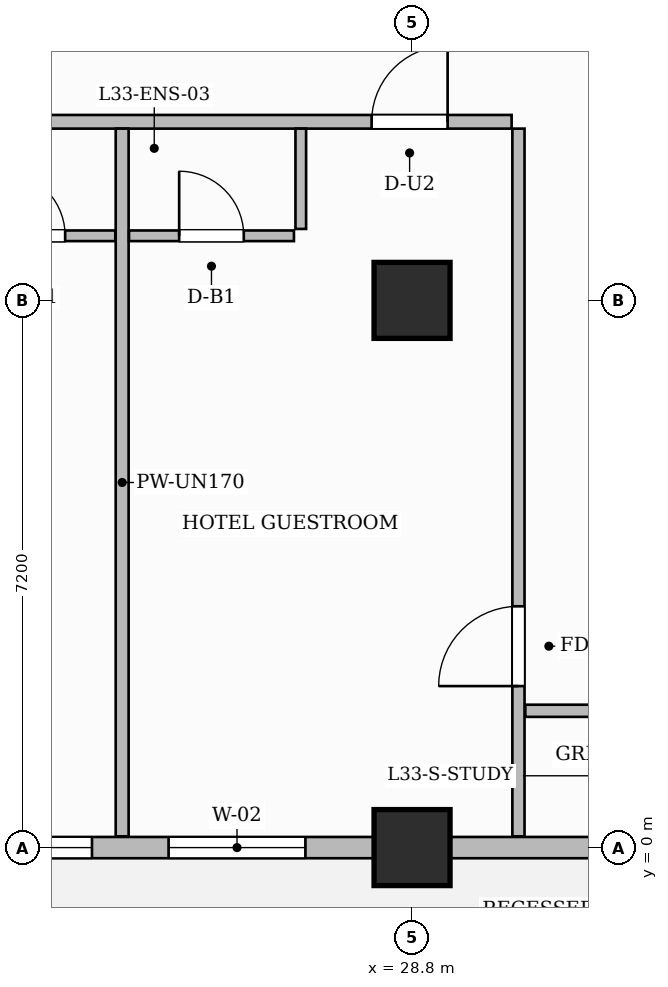
"""IFC4 building model, lengths in metres.
Left out: names, types, materials, properties, quantities, classifications, styles, units other than length and angle.
Written with IfcOpenShell. Run it as: python <this file> out.ifc"""

import sys

from ifc_helpers import new_model, si_unit, direction, frame, frame_2d, origin, origin_2d, place, context, subcontext, project, spatial, rectangle, extrude, source, transform, mapped, element, fill, save


model = new_model("IFC4")
c1 = context("Model", 3, precision=1e-05, world=origin(), true_north=direction((0.0, 1.0)))
c2 = subcontext(c1, "Body", "Model", "MODEL_VIEW")
j1 = project(units=[si_unit("LENGTHUNIT", "METRE"), si_unit("PLANEANGLEUNIT", "RADIAN")], contexts=[c1])
p1 = place(None, origin())
s1 = spatial("IfcSite", under=j1, at=p1, CompositionType="ELEMENT")
p2 = place(p1, origin())
s2 = spatial("IfcBuilding", under=s1, at=p2, CompositionType="ELEMENT")
p3 = place(p2, frame((0.0, 0.0, 134.0)))
s3 = spatial("IfcBuildingStorey", under=s2, at=p3, CompositionType="ELEMENT", Elevation=134.0)
m1 = source(origin(), c2, "Body", "SweptSolid", [
    extrude(rectangle(XDim=1.0, YDim=1.0, at=origin_2d()), origin(), (0.0, 0.0, 1.0), 3.7),
])
for number, where, z_axis, x_axis in (
    (1, (28.8, 0.0, 0.0), (0.0, 0.0, 1.0), (1.0, 0.0, 0.0)),
    (2, (28.8, 7.2, 0.0), (0.0, 0.0, 1.0), (1.0, 0.0, 0.0)),
):
    element("IfcColumn", number, at=place(p3, frame(where, z_axis=z_axis, x_axis=x_axis)), inside=s3, PredefinedType="COLUMN", context=c2, shape_type="MappedRepresentation", body=[
        mapped(m1, transform((0.0, 0.0, 0.0), scale=1.0)),
    ])
p4 = place(p3, frame((14.548, 9.55, 0.0), z_axis=(0.0, 0.0, 1.0), x_axis=(1.0, 0.0, 0.0)))
e3 = element("IfcWall", 3, at=p4, inside=s3, PredefinedType="PARTITIONING", context=c2, shape_type="SweptSolid", body=[
    extrude(rectangle(XDim=15.562, YDim=0.18, at=frame_2d((7.781, 0.0))), origin(), (0.0, 0.0, 1.0), 3.45),
])
p5 = place(p4, frame((2.908, 0.0, 0.0)))
e4 = element("IfcOpeningElement", 4, at=p5, cuts=e3, PredefinedType="OPENING", context=c2, shape_type="SweptSolid", body=[
    extrude(rectangle(XDim=1.0, YDim=2.2, at=frame_2d((0.5, 1.1))), frame((0.0, 0.1, 0.0), z_axis=(0.0, -1.0, 0.0), x_axis=(1.0, 0.0, 0.0)), (0.0, 0.0, 1.0), 0.2),
])
p6 = place(p4, frame((5.985, 0.0, 0.0)))
e5 = element("IfcOpeningElement", 5, at=p6, cuts=e3, PredefinedType="OPENING", context=c2, shape_type="SweptSolid", body=[
    extrude(rectangle(XDim=1.05, YDim=2.25, at=frame_2d((0.525, 1.125))), frame((0.0, 0.1, 0.0), z_axis=(0.0, -1.0, 0.0), x_axis=(1.0, 0.0, 0.0)), (0.0, 0.0, 1.0), 0.2),
])
p7 = place(p4, frame((13.72, 0.0, 0.0)))
e6 = element("IfcOpeningElement", 6, at=p7, cuts=e3, PredefinedType="OPENING", context=c2, shape_type="SweptSolid", body=[
    extrude(rectangle(XDim=1.0, YDim=2.2, at=frame_2d((0.5, 1.1))), frame((0.0, 0.1, 0.0), z_axis=(0.0, -1.0, 0.0), x_axis=(1.0, 0.0, 0.0)), (0.0, 0.0, 1.0), 0.2),
])
p8 = place(p3, frame((30.2, 0.148, 0.0), z_axis=(0.0, 0.0, 1.0), x_axis=(0.0, 1.0, 0.0)))
e7 = element("IfcWall", 7, at=p8, inside=s3, PredefinedType="PARTITIONING", context=c2, shape_type="SweptSolid", body=[
    extrude(rectangle(XDim=9.312, YDim=0.16, at=frame_2d((4.656, 0.0))), origin(), (0.0, 0.0, 1.0), 3.45),
])
p9 = place(p8, frame((1.977, 0.0, 0.0)))
e8 = element("IfcOpeningElement", 8, at=p9, cuts=e7, PredefinedType="OPENING", context=c2, shape_type="SweptSolid", body=[
    extrude(rectangle(XDim=1.05, YDim=2.15, at=frame_2d((0.525, 1.075))), frame((0.0, 0.09, 0.0), z_axis=(0.0, -1.0, 0.0), x_axis=(1.0, 0.0, 0.0)), (0.0, 0.0, 1.0), 0.18),
])
p10 = place(p3, frame((30.29, 1.8, 0.0), z_axis=(0.0, 0.0, 1.0), x_axis=(1.0, 0.0, 0.0)))
e9 = element("IfcWall", 9, at=p10, inside=s3, PredefinedType="PARTITIONING", context=c2, shape_type="SweptSolid", body=[
    extrude(rectangle(XDim=19.37, YDim=0.16, at=frame_2d((9.685, 0.0))), origin(), (0.0, 0.0, 1.0), 3.45),
])
p11 = place(p10, frame((5.074, 0.0, 0.0)))
e10 = element("IfcOpeningElement", 10, at=p11, cuts=e9, PredefinedType="OPENING", context=c2, shape_type="SweptSolid", body=[
    extrude(rectangle(XDim=0.9, YDim=2.15, at=frame_2d((0.45, 1.075))), frame((0.0, 0.09, 0.0), z_axis=(0.0, -1.0, 0.0), x_axis=(1.0, 0.0, 0.0)), (0.0, 0.0, 1.0), 0.18),
])
p12 = place(p10, frame((14.06, 0.0, 0.0)))
e11 = element("IfcOpeningElement", 11, at=p12, cuts=e9, PredefinedType="OPENING", context=c2, shape_type="SweptSolid", body=[
    extrude(rectangle(XDim=0.9, YDim=2.15, at=frame_2d((0.45, 1.075))), frame((0.0, 0.09, 0.0), z_axis=(0.0, -1.0, 0.0), x_axis=(1.0, 0.0, 0.0)), (0.0, 0.0, 1.0), 0.18),
])
p13 = place(p3, frame((24.986, 0.148, 0.0), z_axis=(0.0, 0.0, 1.0), x_axis=(0.0, 1.0, 0.0)))
e12 = element("IfcWall", 12, at=p13, inside=s3, PredefinedType="PARTITIONING", context=c2, shape_type="SweptSolid", body=[
    extrude(rectangle(XDim=9.312, YDim=0.17, at=frame_2d((4.656, 0.0))), origin(), (0.0, 0.0, 1.0), 3.105),
])
p14 = place(p3, frame((22.726, 8.05, 0.0), z_axis=(0.0, 0.0, 1.0), x_axis=(1.0, 0.0, 0.0)))
e13 = element("IfcWall", 13, at=p14, inside=s3, PredefinedType="PARTITIONING", context=c2, shape_type="SweptSolid", body=[
    extrude(rectangle(XDim=2.17, YDim=0.14, at=frame_2d((1.085, 0.0))), origin(), (0.0, 0.0, 1.0), 3.45),
])
p15 = place(p14, frame((0.66, 0.0, 0.0)))
e14 = element("IfcOpeningElement", 14, at=p15, cuts=e13, PredefinedType="OPENING", context=c2, shape_type="SweptSolid", body=[
    extrude(rectangle(XDim=0.85, YDim=2.1, at=frame_2d((0.425, 1.05))), frame((0.0, 0.08, 0.0), z_axis=(0.0, -1.0, 0.0), x_axis=(1.0, 0.0, 0.0)), (0.0, 0.0, 1.0), 0.16),
])
p16 = place(p3, frame((27.336, 8.14, 0.0), z_axis=(0.0, 0.0, 1.0), x_axis=(0.0, 1.0, 0.0)))
e15 = element("IfcWall", 15, at=p16, inside=s3, PredefinedType="PARTITIONING", context=c2, shape_type="SweptSolid", body=[
    extrude(rectangle(XDim=1.32, YDim=0.14, at=frame_2d((0.66, 0.0))), origin(), (0.0, 0.0, 1.0), 3.45),
])
p17 = place(p3, frame((25.076, 8.05, 0.0), z_axis=(0.0, 0.0, 1.0), x_axis=(1.0, 0.0, 0.0)))
e16 = element("IfcWall", 16, at=p17, inside=s3, PredefinedType="PARTITIONING", context=c2, shape_type="SweptSolid", body=[
    extrude(rectangle(XDim=2.17, YDim=0.14, at=frame_2d((1.085, 0.0))), origin(), (0.0, 0.0, 1.0), 3.45),
])
p18 = place(p17, frame((0.66, 0.0, 0.0)))
e17 = element("IfcOpeningElement", 17, at=p18, cuts=e16, PredefinedType="OPENING", context=c2, shape_type="SweptSolid", body=[
    extrude(rectangle(XDim=0.85, YDim=2.1, at=frame_2d((0.425, 1.05))), frame((0.0, 0.08, 0.0), z_axis=(0.0, -1.0, 0.0), x_axis=(1.0, 0.0, 0.0)), (0.0, 0.0, 1.0), 0.16),
])
p19 = place(p3, frame((14.4, 0.0, 0.0), z_axis=(0.0, 0.0, 1.0), x_axis=(1.0, 0.0, 0.0)))
e18 = element("IfcWall", 18, at=p19, inside=s3, PredefinedType="SOLIDWALL", context=c2, shape_type="SweptSolid", body=[
    extrude(rectangle(XDim=35.4, YDim=0.28, at=frame_2d((17.7, 0.0))), origin(), (0.0, 0.0, 1.0), 2.935),
])
p20 = place(p19, frame((0.85, 0.0, 0.0)))
e19 = element("IfcOpeningElement", 19, at=p20, cuts=e18, PredefinedType="OPENING", context=c2, shape_type="SweptSolid", body=[
    extrude(rectangle(XDim=1.2, YDim=2.2, at=frame_2d((0.6, 1.1))), frame((0.0, 0.15, 0.0), z_axis=(0.0, -1.0, 0.0), x_axis=(1.0, 0.0, 0.0)), (0.0, 0.0, 1.0), 0.3),
])
p21 = place(p19, frame((2.811, 0.0, 0.8)))
e20 = element("IfcOpeningElement", 20, at=p21, cuts=e18, PredefinedType="OPENING", context=c2, shape_type="SweptSolid", body=[
    extrude(rectangle(XDim=1.8, YDim=1.85, at=frame_2d((0.9, 0.925))), frame((0.0, 0.15, 0.0), z_axis=(0.0, -1.0, 0.0), x_axis=(1.0, 0.0, 0.0)), (0.0, 0.0, 1.0), 0.3),
])
p22 = place(p19, frame((5.269, 0.0, 0.8)))
e21 = element("IfcOpeningElement", 21, at=p22, cuts=e18, PredefinedType="OPENING", context=c2, shape_type="SweptSolid", body=[
    extrude(rectangle(XDim=0.95, YDim=1.75, at=frame_2d((0.475, 0.875))), frame((0.0, 0.15, 0.0), z_axis=(0.0, -1.0, 0.0), x_axis=(1.0, 0.0, 0.0)), (0.0, 0.0, 1.0), 0.3),
])
p23 = place(p19, frame((8.389, 0.0, 0.8)))
e22 = element("IfcOpeningElement", 22, at=p23, cuts=e18, PredefinedType="OPENING", context=c2, shape_type="SweptSolid", body=[
    extrude(rectangle(XDim=1.8, YDim=1.85, at=frame_2d((0.9, 0.925))), frame((0.0, 0.15, 0.0), z_axis=(0.0, -1.0, 0.0), x_axis=(1.0, 0.0, 0.0)), (0.0, 0.0, 1.0), 0.3),
])
p24 = place(p19, frame((11.197, 0.0, 0.8)))
e23 = element("IfcOpeningElement", 23, at=p24, cuts=e18, PredefinedType="OPENING", context=c2, shape_type="SweptSolid", body=[
    extrude(rectangle(XDim=1.8, YDim=1.85, at=frame_2d((0.9, 0.925))), frame((0.0, 0.15, 0.0), z_axis=(0.0, -1.0, 0.0), x_axis=(1.0, 0.0, 0.0)), (0.0, 0.0, 1.0), 0.3),
])
p25 = place(p19, frame((16.804, 0.0, 0.8)))
e24 = element("IfcOpeningElement", 24, at=p25, cuts=e18, PredefinedType="OPENING", context=c2, shape_type="SweptSolid", body=[
    extrude(rectangle(XDim=1.8, YDim=1.85, at=frame_2d((0.9, 0.925))), frame((0.0, 0.15, 0.0), z_axis=(0.0, -1.0, 0.0), x_axis=(1.0, 0.0, 0.0)), (0.0, 0.0, 1.0), 0.3),
])
p26 = place(p19, frame((22.396, 0.0, 0.8)))
e25 = element("IfcOpeningElement", 25, at=p26, cuts=e18, PredefinedType="OPENING", context=c2, shape_type="SweptSolid", body=[
    extrude(rectangle(XDim=1.8, YDim=1.85, at=frame_2d((0.9, 0.925))), frame((0.0, 0.15, 0.0), z_axis=(0.0, -1.0, 0.0), x_axis=(1.0, 0.0, 0.0)), (0.0, 0.0, 1.0), 0.3),
])
p27 = place(p19, frame((25.629, 0.0, 0.8)))
e26 = element("IfcOpeningElement", 26, at=p27, cuts=e18, PredefinedType="OPENING", context=c2, shape_type="SweptSolid", body=[
    extrude(rectangle(XDim=0.95, YDim=1.75, at=frame_2d((0.475, 0.875))), frame((0.0, 0.15, 0.0), z_axis=(0.0, -1.0, 0.0), x_axis=(1.0, 0.0, 0.0)), (0.0, 0.0, 1.0), 0.3),
])
p28 = place(p19, frame((29.075, 0.0, 0.8)))
e27 = element("IfcOpeningElement", 27, at=p28, cuts=e18, PredefinedType="OPENING", context=c2, shape_type="SweptSolid", body=[
    extrude(rectangle(XDim=1.8, YDim=1.85, at=frame_2d((0.9, 0.925))), frame((0.0, 0.15, 0.0), z_axis=(0.0, -1.0, 0.0), x_axis=(1.0, 0.0, 0.0)), (0.0, 0.0, 1.0), 0.3),
])
p29 = place(p19, frame((32.125, 0.0, 0.8)))
e28 = element("IfcOpeningElement", 28, at=p29, cuts=e18, PredefinedType="OPENING", context=c2, shape_type="SweptSolid", body=[
    extrude(rectangle(XDim=1.8, YDim=1.85, at=frame_2d((0.9, 0.925))), frame((0.0, 0.15, 0.0), z_axis=(0.0, -1.0, 0.0), x_axis=(1.0, 0.0, 0.0)), (0.0, 0.0, 1.0), 0.3),
])
m2 = source(origin(), c2, "Body", "SweptSolid", [
    extrude(rectangle(XDim=1.05, YDim=2.15, at=frame_2d((0.525, 1.075))), frame((0.0, 0.025, 0.0), z_axis=(0.0, -1.0, 0.0), x_axis=(1.0, 0.0, 0.0)), (0.0, 0.0, 1.0), 0.05),
])
p30 = place(p9, origin())
e29 = element("IfcDoor", 29, at=p30, inside=s3, OperationType="SINGLE_SWING_LEFT", PredefinedType="DOOR", context=c2, shape_type="MappedRepresentation", body=[
    mapped(m2, transform((0.0, 0.0, 0.0), scale=1.0)),
])
fill(e8, e29)
m3 = source(origin(), c2, "Body", "SweptSolid", [
    extrude(rectangle(XDim=0.85, YDim=2.1, at=frame_2d((0.425, 1.05))), frame((0.0, 0.025, 0.0), z_axis=(0.0, -1.0, 0.0), x_axis=(1.0, 0.0, 0.0)), (0.0, 0.0, 1.0), 0.05),
])
p31 = place(p15, origin())
e30 = element("IfcDoor", 30, at=p31, inside=s3, OperationType="SINGLE_SWING_LEFT", PredefinedType="DOOR", context=c2, shape_type="MappedRepresentation", body=[
    mapped(m3, transform((0.0, 0.0, 0.0), scale=1.0)),
])
fill(e14, e30)
p32 = place(p18, origin())
e31 = element("IfcDoor", 31, at=p32, inside=s3, OperationType="SINGLE_SWING_LEFT", PredefinedType="DOOR", context=c2, shape_type="MappedRepresentation", body=[
    mapped(m3, transform((0.0, 0.0, 0.0), scale=1.0)),
])
fill(e17, e31)
m4 = source(origin(), c2, "Body", "SweptSolid", [
    extrude(rectangle(XDim=1.0, YDim=2.2, at=frame_2d((0.5, 1.1))), frame((0.0, 0.025, 0.0), z_axis=(0.0, -1.0, 0.0), x_axis=(1.0, 0.0, 0.0)), (0.0, 0.0, 1.0), 0.05),
])
p33 = place(p7, origin())
e32 = element("IfcDoor", 32, at=p33, inside=s3, OperationType="SINGLE_SWING_RIGHT", PredefinedType="DOOR", context=c2, shape_type="MappedRepresentation", body=[
    mapped(m4, transform((0.0, 0.0, 0.0), scale=1.0)),
])
fill(e6, e32)
m5 = source(origin(), c2, "Body", "SweptSolid", [
    extrude(rectangle(XDim=1.8, YDim=1.85, at=frame_2d((0.9, 0.925))), frame((0.0, 0.03, 0.0), z_axis=(0.0, -1.0, 0.0), x_axis=(1.0, 0.0, 0.0)), (0.0, 0.0, 1.0), 0.06),
])
p34 = place(p23, origin())
e33 = element("IfcWindow", 33, at=p34, inside=s3, PartitioningType="DOUBLE_PANEL_VERTICAL", PredefinedType="WINDOW", context=c2, shape_type="MappedRepresentation", body=[
    mapped(m5, transform((0.0, 0.0, 0.0), scale=1.0)),
])
fill(e22, e33)
p35 = place(p24, origin())
e34 = element("IfcWindow", 34, at=p35, inside=s3, PartitioningType="DOUBLE_PANEL_VERTICAL", PredefinedType="WINDOW", context=c2, shape_type="MappedRepresentation", body=[
    mapped(m5, transform((0.0, 0.0, 0.0), scale=1.0)),
])
fill(e23, e34)
save(model, sys.argv[1])
